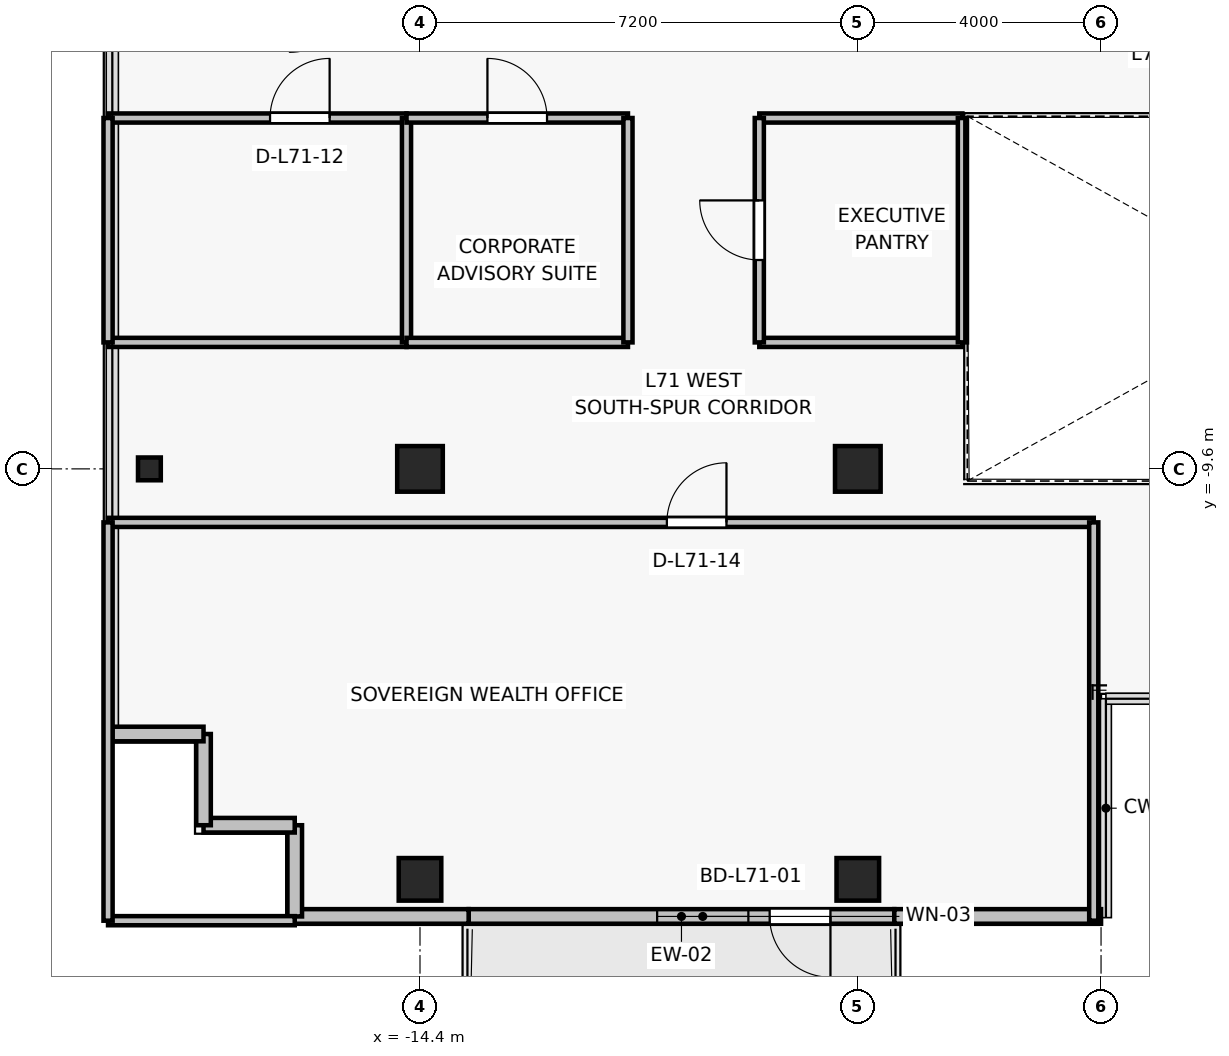
"""IFC4 building model, lengths in metres.
Left out: names, types, materials, properties, quantities, classifications, styles, units other than length and angle.
Written with IfcOpenShell. Run it as: python <this file> out.ifc"""

import sys

from ifc_helpers import new_model, si_unit, direction, frame, frame_2d, origin, origin_2d, place, context, subcontext, project, spatial, rectangle, i_section, extrude, source, transform, mapped, element, fill, save


model = new_model("IFC4")
c1 = context("Model", 3, precision=1e-05, world=origin(), true_north=direction((0.0, 1.0)))
c2 = subcontext(c1, "Body", "Model", "MODEL_VIEW")
j1 = project(units=[si_unit("LENGTHUNIT", "METRE"), si_unit("PLANEANGLEUNIT", "RADIAN")], contexts=[c1])
p1 = place(None, origin())
s1 = spatial("IfcSite", under=j1, at=p1, CompositionType="ELEMENT")
p2 = place(p1, origin())
s2 = spatial("IfcBuilding", under=s1, at=p2, CompositionType="ELEMENT")
p3 = place(p2, frame((0.0, 0.0, 251.8)))
s3 = spatial("IfcBuildingStorey", under=s2, at=p3, CompositionType="ELEMENT", Elevation=251.8)
for number, where, z_axis, x_axis in (
    (1, (-14.4, -9.6, 0.0), (0.0, 0.0, 1.0), (1.0, 0.0, 0.0)),
    (2, (-7.2, -9.6, 0.0), (0.0, 0.0, 1.0), (1.0, 0.0, 0.0)),
):
    element("IfcColumn", number, at=place(p3, frame(where, z_axis=z_axis, x_axis=x_axis)), inside=s3, PredefinedType="COLUMN", context=c2, shape_type="SweptSolid", body=[
        extrude(rectangle(XDim=0.75, YDim=0.75, at=origin_2d()), origin(), (0.0, 0.0, 1.0), 3.3),
    ])
for number, where, z_axis, x_axis in (
    (3, (-14.4, -16.35, 0.0), (0.0, 0.0, 1.0), (1.0, 0.0, 0.0)),
    (4, (-7.2, -16.35, 0.0), (0.0, 0.0, 1.0), (1.0, 0.0, 0.0)),
):
    element("IfcColumn", number, at=place(p3, frame(where, z_axis=z_axis, x_axis=x_axis)), inside=s3, PredefinedType="COLUMN", context=c2, shape_type="SweptSolid", body=[
        extrude(rectangle(XDim=0.7, YDim=0.7, at=origin_2d()), origin(), (0.0, 0.0, 1.0), 3.3),
    ])
p4 = place(p3, frame((-18.85, -9.6, 0.0), z_axis=(0.0, 0.0, 1.0), x_axis=(1.0, 0.0, 0.0)))
e5 = element("IfcColumn", 5, at=p4, inside=s3, PredefinedType="COLUMN", context=c2, shape_type="SweptSolid", body=[
    extrude(i_section(OverallWidth=0.375, OverallDepth=0.375, WebThickness=0.017, FlangeThickness=0.027, FilletRadius=0.015, at=origin_2d()), origin(), (0.0, 0.0, 1.0), 3.3),
])
p5 = place(p3, frame((-6.6, -16.96, 0.0), z_axis=(0.0, 0.0, 1.0), x_axis=(-1.0, 0.0, 0.0)))
e6 = element("IfcWall", 6, at=p5, inside=s3, PredefinedType="SOLIDWALL", context=c2, shape_type="SweptSolid", body=[
    extrude(rectangle(XDim=7.0, YDim=0.24, at=frame_2d((3.5, 0.0))), origin(), (0.0, 0.0, 1.0), 2.665),
])
p6 = place(p5, frame((1.05, 0.0, 0.0)))
e7 = element("IfcOpeningElement", 7, at=p6, cuts=e6, PredefinedType="OPENING", context=c2, shape_type="SweptSolid", body=[
    extrude(rectangle(XDim=1.0, YDim=2.2, at=frame_2d((0.5, 1.1))), frame((0.0, 0.13, 0.0), z_axis=(0.0, -1.0, 0.0), x_axis=(1.0, 0.0, 0.0)), (0.0, 0.0, 1.0), 0.26),
])
p7 = place(p5, frame((2.4, 0.0, 0.85)))
e8 = element("IfcOpeningElement", 8, at=p7, cuts=e6, PredefinedType="OPENING", context=c2, shape_type="SweptSolid", body=[
    extrude(rectangle(XDim=1.5, YDim=1.6, at=frame_2d((0.75, 0.8))), frame((0.0, 0.13, 0.0), z_axis=(0.0, -1.0, 0.0), x_axis=(1.0, 0.0, 0.0)), (0.0, 0.0, 1.0), 0.26),
])
p8 = place(p3, frame((-6.6, -16.96, 0.0), z_axis=(0.0, 0.0, 1.0), x_axis=(1.0, 0.0, 0.0)))
e9 = element("IfcWall", 9, at=p8, inside=s3, PredefinedType="SOLIDWALL", context=c2, shape_type="SweptSolid", body=[
    extrude(rectangle(XDim=3.4, YDim=0.24, at=frame_2d((1.7, 0.0))), origin(), (0.0, 0.0, 1.0), 3.075),
])
p9 = place(p3, frame((-16.46, -16.96, 0.0), z_axis=(0.0, 0.0, 1.0), x_axis=(1.0, 0.0, 0.0)))
e10 = element("IfcWall", 10, at=p9, inside=s3, PredefinedType="SOLIDWALL", context=c2, shape_type="SweptSolid", body=[
    extrude(rectangle(XDim=2.86, YDim=0.24, at=frame_2d((1.43, 0.0))), origin(), (0.0, 0.0, 1.0), 2.665),
])
for number, where, z_axis, x_axis in (
    (11, (-16.46, -15.46, 0.0), (0.0, 0.0, 1.0), (0.0, -1.0, 0.0)),
    (12, (-17.96, -15.46, 0.0), (0.0, 0.0, 1.0), (1.0, 0.0, 0.0)),
    (13, (-17.96, -13.96, 0.0), (0.0, 0.0, 1.0), (0.0, -1.0, 0.0)),
    (14, (-19.46, -13.96, 0.0), (0.0, 0.0, 1.0), (1.0, 0.0, 0.0)),
):
    element("IfcWall", number, at=place(p3, frame(where, z_axis=z_axis, x_axis=x_axis)), inside=s3, PredefinedType="SOLIDWALL", context=c2, shape_type="SweptSolid", body=[
        extrude(rectangle(XDim=1.5, YDim=0.24, at=frame_2d((0.75, 0.0))), origin(), (0.0, 0.0, 1.0), 3.075),
    ])
p10 = place(p3, frame((-14.622, -7.52, 0.0), z_axis=(0.0, 0.0, 1.0), x_axis=(-1.0, 0.0, 0.0)))
e15 = element("IfcWall", 15, at=p10, inside=s3, PredefinedType="PARTITIONING", context=c2, shape_type="SweptSolid", body=[
    extrude(rectangle(XDim=4.908, YDim=0.15, at=frame_2d((2.454, 0.0))), origin(), (0.0, 0.0, 1.0), 2.615),
])
p11 = place(p3, frame((-19.53, -3.83, 0.0), z_axis=(0.0, 0.0, 1.0), x_axis=(1.0, 0.0, 0.0)))
e16 = element("IfcWall", 16, at=p11, inside=s3, PredefinedType="PARTITIONING", context=c2, shape_type="SweptSolid", body=[
    extrude(rectangle(XDim=4.908, YDim=0.15, at=frame_2d((2.454, 0.0))), origin(), (0.0, 0.0, 1.0), 2.615),
])
p12 = place(p11, frame((2.664, 0.0, 0.0)))
e17 = element("IfcOpeningElement", 17, at=p12, cuts=e16, PredefinedType="OPENING", context=c2, shape_type="SweptSolid", body=[
    extrude(rectangle(XDim=0.98, YDim=2.15, at=frame_2d((0.49, 1.075))), frame((0.0, 0.085, 0.0), z_axis=(0.0, -1.0, 0.0), x_axis=(1.0, 0.0, 0.0)), (0.0, 0.0, 1.0), 0.17),
])
p13 = place(p3, frame((-19.53, -7.52, 0.0), z_axis=(0.0, 0.0, 1.0), x_axis=(0.0, 1.0, 0.0)))
e18 = element("IfcWall", 18, at=p13, inside=s3, PredefinedType="PARTITIONING", context=c2, shape_type="SweptSolid", body=[
    extrude(rectangle(XDim=3.69, YDim=0.15, at=frame_2d((1.845, 0.0))), origin(), (0.0, 0.0, 1.0), 3.075),
])
p14 = place(p3, frame((-14.622, -3.83, 0.0), z_axis=(0.0, 0.0, 1.0), x_axis=(0.0, -1.0, 0.0)))
e19 = element("IfcWall", 19, at=p14, inside=s3, PredefinedType="PARTITIONING", context=c2, shape_type="SweptSolid", body=[
    extrude(rectangle(XDim=3.69, YDim=0.15, at=frame_2d((1.845, 0.0))), origin(), (0.0, 0.0, 1.0), 2.615),
])
p15 = place(p3, frame((-10.98, -7.52, 0.0), z_axis=(0.0, 0.0, 1.0), x_axis=(-1.0, 0.0, 0.0)))
e20 = element("IfcWall", 20, at=p15, inside=s3, PredefinedType="PARTITIONING", context=c2, shape_type="SweptSolid", body=[
    extrude(rectangle(XDim=3.642, YDim=0.15, at=frame_2d((1.821, 0.0))), origin(), (0.0, 0.0, 1.0), 2.615),
])
p16 = place(p3, frame((-14.622, -3.83, 0.0), z_axis=(0.0, 0.0, 1.0), x_axis=(1.0, 0.0, 0.0)))
e21 = element("IfcWall", 21, at=p16, inside=s3, PredefinedType="PARTITIONING", context=c2, shape_type="SweptSolid", body=[
    extrude(rectangle(XDim=3.642, YDim=0.15, at=frame_2d((1.821, 0.0))), origin(), (0.0, 0.0, 1.0), 2.615),
])
p17 = place(p16, frame((1.331, 0.0, 0.0)))
e22 = element("IfcOpeningElement", 22, at=p17, cuts=e21, PredefinedType="OPENING", context=c2, shape_type="SweptSolid", body=[
    extrude(rectangle(XDim=0.98, YDim=2.15, at=frame_2d((0.49, 1.075))), frame((0.0, 0.085, 0.0), z_axis=(0.0, -1.0, 0.0), x_axis=(1.0, 0.0, 0.0)), (0.0, 0.0, 1.0), 0.17),
])
p18 = place(p3, frame((-10.98, -3.83, 0.0), z_axis=(0.0, 0.0, 1.0), x_axis=(0.0, -1.0, 0.0)))
e23 = element("IfcWall", 23, at=p18, inside=s3, PredefinedType="PARTITIONING", context=c2, shape_type="SweptSolid", body=[
    extrude(rectangle(XDim=3.69, YDim=0.15, at=frame_2d((1.845, 0.0))), origin(), (0.0, 0.0, 1.0), 2.705),
])
p19 = place(p3, frame((-16.46, -17.03, 0.0), z_axis=(0.0, 0.0, 1.0), x_axis=(-1.0, 0.0, 0.0)))
e24 = element("IfcWall", 24, at=p19, inside=s3, PredefinedType="PARTITIONING", context=c2, shape_type="SweptSolid", body=[
    extrude(rectangle(XDim=3.07, YDim=0.15, at=frame_2d((1.535, 0.0))), origin(), (0.0, 0.0, 1.0), 2.665),
])
p20 = place(p3, frame((-19.53, -10.48, 0.0), z_axis=(0.0, 0.0, 1.0), x_axis=(1.0, 0.0, 0.0)))
e25 = element("IfcWall", 25, at=p20, inside=s3, PredefinedType="PARTITIONING", context=c2, shape_type="SweptSolid", body=[
    extrude(rectangle(XDim=16.21, YDim=0.15, at=frame_2d((8.105, 0.0))), origin(), (0.0, 0.0, 1.0), 2.615),
])
p21 = place(p20, frame((9.19, 0.0, 0.0)))
e26 = element("IfcOpeningElement", 26, at=p21, cuts=e25, PredefinedType="OPENING", context=c2, shape_type="SweptSolid", body=[
    extrude(rectangle(XDim=0.98, YDim=2.15, at=frame_2d((0.49, 1.075))), frame((0.0, 0.085, 0.0), z_axis=(0.0, -1.0, 0.0), x_axis=(1.0, 0.0, 0.0)), (0.0, 0.0, 1.0), 0.17),
])
p22 = place(p3, frame((-19.53, -17.03, 0.0), z_axis=(0.0, 0.0, 1.0), x_axis=(0.0, 1.0, 0.0)))
e27 = element("IfcWall", 27, at=p22, inside=s3, PredefinedType="PARTITIONING", context=c2, shape_type="SweptSolid", body=[
    extrude(rectangle(XDim=6.55, YDim=0.15, at=frame_2d((3.275, 0.0))), origin(), (0.0, 0.0, 1.0), 3.075),
])
p23 = place(p3, frame((-3.32, -10.48, 0.0), z_axis=(0.0, 0.0, 1.0), x_axis=(0.0, -1.0, 0.0)))
e28 = element("IfcWall", 28, at=p23, inside=s3, PredefinedType="PARTITIONING", context=c2, shape_type="SweptSolid", body=[
    extrude(rectangle(XDim=6.55, YDim=0.15, at=frame_2d((3.275, 0.0))), origin(), (0.0, 0.0, 1.0), 2.615),
])
for number, where, z_axis, x_axis in (
    (29, (-5.48, -7.52, 0.0), (0.0, 0.0, 1.0), (-1.0, 0.0, 0.0)),
    (30, (-8.82, -3.83, 0.0), (0.0, 0.0, 1.0), (1.0, 0.0, 0.0)),
):
    element("IfcWall", number, at=place(p3, frame(where, z_axis=z_axis, x_axis=x_axis)), inside=s3, PredefinedType="PARTITIONING", context=c2, shape_type="SweptSolid", body=[
        extrude(rectangle(XDim=3.34, YDim=0.15, at=frame_2d((1.67, 0.0))), origin(), (0.0, 0.0, 1.0), 2.615),
    ])
p24 = place(p3, frame((-8.82, -7.52, 0.0), z_axis=(0.0, 0.0, 1.0), x_axis=(0.0, 1.0, 0.0)))
e31 = element("IfcWall", 31, at=p24, inside=s3, PredefinedType="PARTITIONING", context=c2, shape_type="SweptSolid", body=[
    extrude(rectangle(XDim=3.69, YDim=0.15, at=frame_2d((1.845, 0.0))), origin(), (0.0, 0.0, 1.0), 2.705),
])
p25 = place(p24, frame((1.355, 0.0, 0.0)))
e32 = element("IfcOpeningElement", 32, at=p25, cuts=e31, PredefinedType="OPENING", context=c2, shape_type="SweptSolid", body=[
    extrude(rectangle(XDim=0.98, YDim=2.15, at=frame_2d((0.49, 1.075))), frame((0.0, 0.085, 0.0), z_axis=(0.0, -1.0, 0.0), x_axis=(1.0, 0.0, 0.0)), (0.0, 0.0, 1.0), 0.17),
])
p26 = place(p3, frame((-5.48, -3.83, 0.0), z_axis=(0.0, 0.0, 1.0), x_axis=(0.0, -1.0, 0.0)))
e33 = element("IfcWall", 33, at=p26, inside=s3, PredefinedType="PARTITIONING", context=c2, shape_type="SweptSolid", body=[
    extrude(rectangle(XDim=3.69, YDim=0.15, at=frame_2d((1.845, 0.0))), origin(), (0.0, 0.0, 1.0), 3.075),
])
m1 = source(origin(), c2, "Body", "SweptSolid", [
    extrude(rectangle(XDim=1.0, YDim=2.2, at=frame_2d((0.5, 1.1))), frame((0.0, 0.025, 0.0), z_axis=(0.0, -1.0, 0.0), x_axis=(1.0, 0.0, 0.0)), (0.0, 0.0, 1.0), 0.05),
])
p27 = place(p6, origin())
e34 = element("IfcDoor", 34, at=p27, inside=s3, OperationType="SINGLE_SWING_LEFT", PredefinedType="DOOR", context=c2, shape_type="MappedRepresentation", body=[
    mapped(m1, transform((0.0, 0.0, 0.0), x_axis=(1.0, 0.0, 0.0), y_axis=(0.0, 1.0, 0.0), z_axis=(0.0, 0.0, 1.0), scale=1.0)),
])
fill(e7, e34)
m2 = source(origin(), c2, "Body", "SweptSolid", [
    extrude(rectangle(XDim=1.5, YDim=1.6, at=frame_2d((0.75, 0.8))), frame((0.0, 0.03, 0.0), z_axis=(0.0, -1.0, 0.0), x_axis=(1.0, 0.0, 0.0)), (0.0, 0.0, 1.0), 0.06),
])
p28 = place(p7, origin())
e35 = element("IfcWindow", 35, at=p28, inside=s3, PartitioningType="SINGLE_PANEL", PredefinedType="WINDOW", context=c2, shape_type="MappedRepresentation", body=[
    mapped(m2, transform((0.0, 0.0, 0.0), x_axis=(1.0, 0.0, 0.0), y_axis=(0.0, 1.0, 0.0), z_axis=(0.0, 0.0, 1.0), scale=1.0)),
])
fill(e8, e35)
m3 = source(origin(), c2, "Body", "SweptSolid", [
    extrude(rectangle(XDim=0.98, YDim=2.15, at=frame_2d((0.49, 1.075))), frame((0.0, 0.025, 0.0), z_axis=(0.0, -1.0, 0.0), x_axis=(1.0, 0.0, 0.0)), (0.0, 0.0, 1.0), 0.05),
])
p29 = place(p12, origin())
e36 = element("IfcDoor", 36, at=p29, inside=s3, OperationType="SINGLE_SWING_RIGHT", PredefinedType="DOOR", context=c2, shape_type="MappedRepresentation", body=[
    mapped(m3, transform((0.0, 0.0, 0.0), x_axis=(1.0, 0.0, 0.0), y_axis=(0.0, 1.0, 0.0), z_axis=(0.0, 0.0, 1.0), scale=1.0)),
])
fill(e17, e36)
p30 = place(p17, origin())
e37 = element("IfcDoor", 37, at=p30, inside=s3, OperationType="SINGLE_SWING_LEFT", PredefinedType="DOOR", context=c2, shape_type="MappedRepresentation", body=[
    mapped(m3, transform((0.0, 0.0, 0.0), x_axis=(1.0, 0.0, 0.0), y_axis=(0.0, 1.0, 0.0), z_axis=(0.0, 0.0, 1.0), scale=1.0)),
])
fill(e22, e37)
p31 = place(p21, origin())
e38 = element("IfcDoor", 38, at=p31, inside=s3, OperationType="SINGLE_SWING_RIGHT", PredefinedType="DOOR", context=c2, shape_type="MappedRepresentation", body=[
    mapped(m3, transform((0.0, 0.0, 0.0), x_axis=(1.0, 0.0, 0.0), y_axis=(0.0, 1.0, 0.0), z_axis=(0.0, 0.0, 1.0), scale=1.0)),
])
fill(e26, e38)
p32 = place(p25, origin())
e39 = element("IfcDoor", 39, at=p32, inside=s3, OperationType="SINGLE_SWING_RIGHT", PredefinedType="DOOR", context=c2, shape_type="MappedRepresentation", body=[
    mapped(m3, transform((0.0, 0.0, 0.0), x_axis=(1.0, 0.0, 0.0), y_axis=(0.0, 1.0, 0.0), z_axis=(0.0, 0.0, 1.0), scale=1.0)),
])
fill(e32, e39)
save(model, sys.argv[1])
